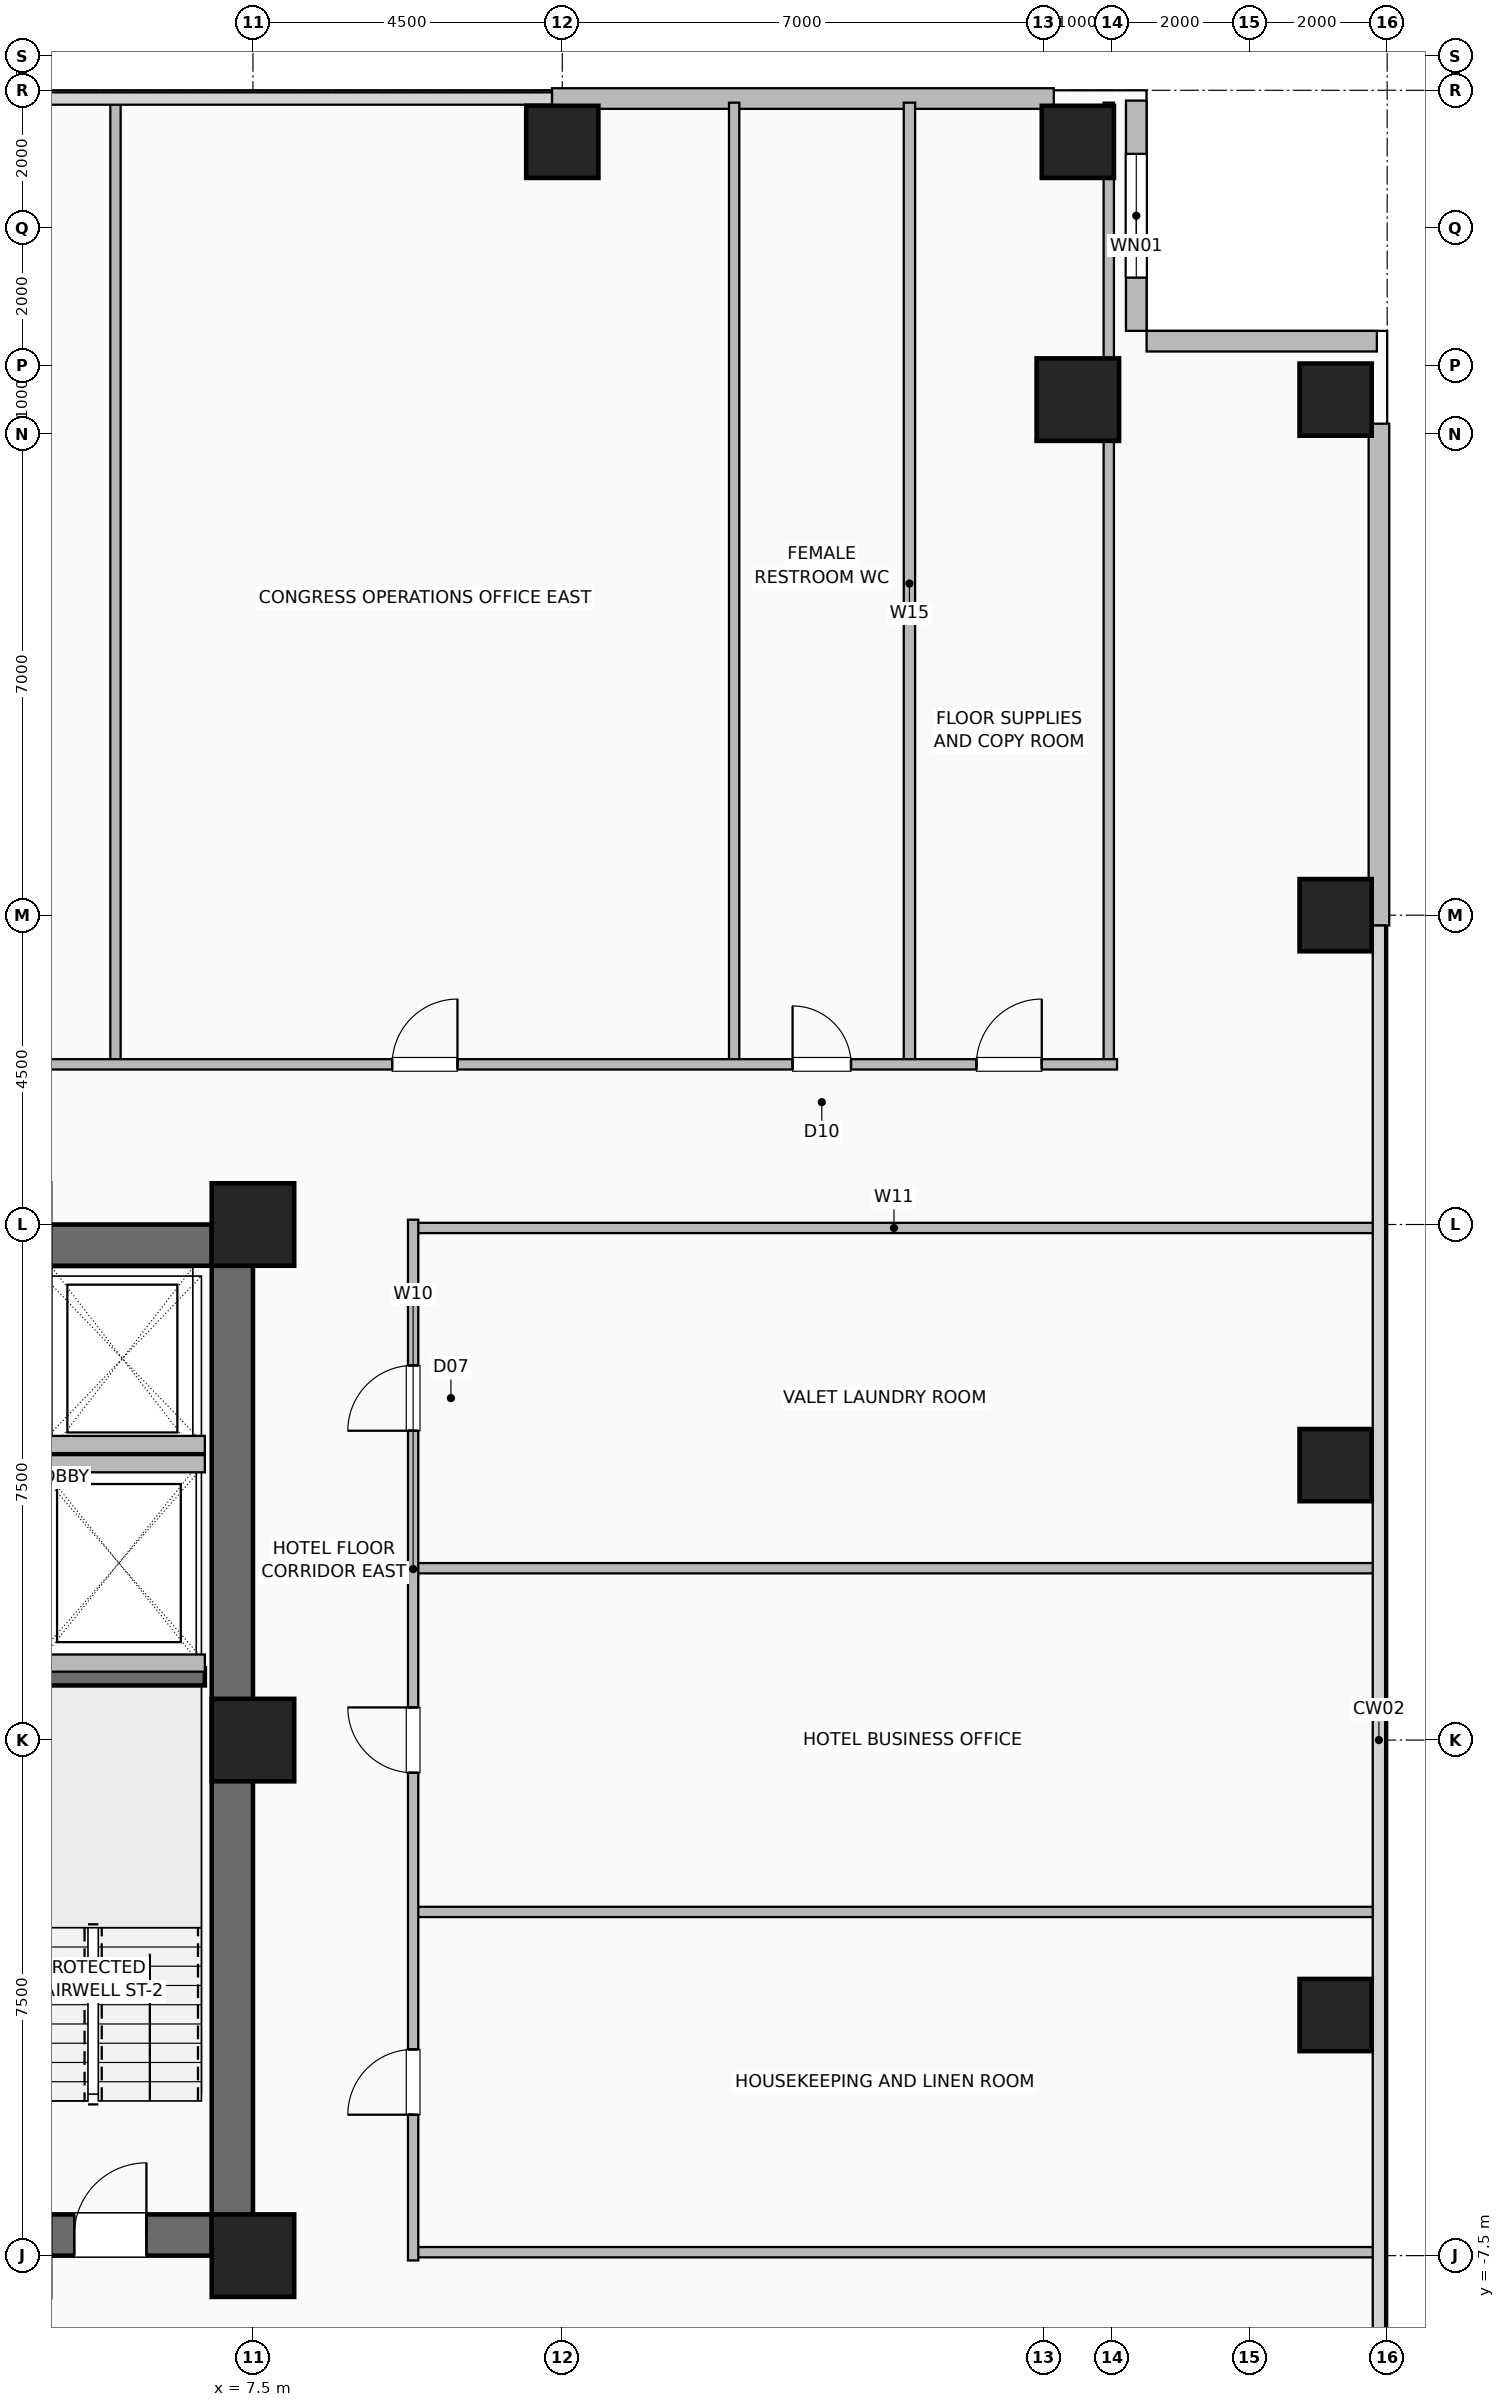
"""IFC4 building model, lengths in metres.
Left out: names, types, materials, properties, quantities, classifications, styles, units other than length and angle.
Written with IfcOpenShell. Run it as: python <this file> out.ifc"""

import sys

from ifc_helpers import new_model, si_unit, direction, frame, frame_2d, origin, origin_2d, place, context, subcontext, project, spatial, rectangle, hollow_rectangle, extrude, element, fill, save


model = new_model("IFC4")
c1 = context("Model", 3, precision=1e-05, world=origin(), true_north=direction((0.0, 1.0)))
c2 = subcontext(c1, "Body", "Model", "MODEL_VIEW")
j1 = project(units=[si_unit("LENGTHUNIT", "METRE"), si_unit("PLANEANGLEUNIT", "RADIAN")], contexts=[c1])
p1 = place(None, origin())
s1 = spatial("IfcSite", under=j1, at=p1, CompositionType="ELEMENT")
p2 = place(p1, origin())
s2 = spatial("IfcBuilding", under=s1, at=p2, CompositionType="ELEMENT")
p3 = place(p2, frame((0.0, 0.0, 44.5)))
s3 = spatial("IfcBuildingStorey", under=s2, at=p3, CompositionType="ELEMENT", Elevation=44.5)
for number, where, z_axis, x_axis in (
    (1, (7.5, -7.5, 0.0), (0.0, 0.0, 1.0), (1.0, 0.0, 0.0)),
    (2, (7.5, 0.0, 0.0), (0.0, 0.0, 1.0), (1.0, 0.0, 0.0)),
    (3, (7.5, 7.5, 0.0), (0.0, 0.0, 1.0), (1.0, 0.0, 0.0)),
):
    element("IfcColumn", number, at=place(p3, frame(where, z_axis=z_axis, x_axis=x_axis)), inside=s3, PredefinedType="COLUMN", context=c2, shape_type="SweptSolid", body=[
        extrude(hollow_rectangle(XDim=1.2, YDim=1.2, WallThickness=0.055, at=origin_2d()), origin(), (0.0, 0.0, 1.0), 3.5),
    ])
for number, where, z_axis, x_axis in (
    (4, (23.25, -4.0, 0.0), (0.0, 0.0, 1.0), (1.0, 0.0, 0.0)),
    (5, (23.25, 4.0, 0.0), (0.0, 0.0, 1.0), (1.0, 0.0, 0.0)),
    (6, (12.0, 23.25, 0.0), (0.0, 0.0, 1.0), (1.0, 0.0, 0.0)),
    (7, (23.25, 12.0, 0.0), (0.0, 0.0, 1.0), (1.0, 0.0, 0.0)),
    (8, (19.5, 23.25, 0.0), (0.0, 0.0, 1.0), (1.0, 0.0, 0.0)),
    (9, (23.25, 19.5, 0.0), (0.0, 0.0, 1.0), (1.0, 0.0, 0.0)),
):
    element("IfcColumn", number, at=place(p3, frame(where, z_axis=z_axis, x_axis=x_axis)), inside=s3, PredefinedType="COLUMN", context=c2, shape_type="SweptSolid", body=[
        extrude(hollow_rectangle(XDim=1.05, YDim=1.05, WallThickness=0.05, at=origin_2d()), origin(), (0.0, 0.0, 1.0), 3.5),
    ])
p4 = place(p3, frame((19.5, 19.5, 0.0), z_axis=(0.0, 0.0, 1.0), x_axis=(1.0, 0.0, 0.0)))
e10 = element("IfcColumn", 10, at=p4, inside=s3, PredefinedType="COLUMN", context=c2, shape_type="SweptSolid", body=[
    extrude(hollow_rectangle(XDim=1.2, YDim=1.2, WallThickness=0.055, at=origin_2d()), origin(), (0.0, 0.0, 1.0), 3.5),
])
for number, where, z_axis, x_axis in (
    (11, (11.85, 23.88, 0.0), (0.0, 0.0, 1.0), (1.0, 0.0, 0.0)),
    (12, (23.88, 11.85, 0.0), (0.0, 0.0, 1.0), (0.0, 1.0, 0.0)),
):
    element("IfcWall", number, at=place(p3, frame(where, z_axis=z_axis, x_axis=x_axis)), inside=s3, PredefinedType="SOLIDWALL", context=c2, shape_type="SweptSolid", body=[
        extrude(rectangle(XDim=7.3, YDim=0.3, at=frame_2d((3.65, 0.0))), origin(), (0.0, 0.0, 1.0), 3.25),
    ])
p5 = place(p3, frame((20.35, 23.85, 0.0), z_axis=(0.0, 0.0, 1.0), x_axis=(0.0, -1.0, 0.0)))
e13 = element("IfcWall", 13, at=p5, inside=s3, PredefinedType="SOLIDWALL", context=c2, shape_type="SweptSolid", body=[
    extrude(rectangle(XDim=3.35, YDim=0.3, at=frame_2d((1.675, 0.0))), origin(), (0.0, 0.0, 1.0), 3.25),
])
p6 = place(p5, frame((0.775, 0.0, 0.9)))
e14 = element("IfcOpeningElement", 14, at=p6, cuts=e13, PredefinedType="OPENING", context=c2, shape_type="SweptSolid", body=[
    extrude(rectangle(XDim=1.8, YDim=1.8, at=frame_2d((0.9, 0.9))), frame((0.0, 0.16, 0.0), z_axis=(0.0, -1.0, 0.0), x_axis=(1.0, 0.0, 0.0)), (0.0, 0.0, 1.0), 0.32),
])
p7 = place(p3, frame((23.85, 20.35, 0.0), z_axis=(0.0, 0.0, 1.0), x_axis=(-1.0, 0.0, 0.0)))
e15 = element("IfcWall", 15, at=p7, inside=s3, PredefinedType="SOLIDWALL", context=c2, shape_type="SweptSolid", body=[
    extrude(rectangle(XDim=3.35, YDim=0.3, at=frame_2d((1.675, 0.0))), origin(), (0.0, 0.0, 1.0), 3.25),
])
p8 = place(p3, frame((-7.5, -7.2, 0.0), z_axis=(0.0, 0.0, 1.0), x_axis=(1.0, 0.0, 0.0)))
e16 = element("IfcWall", 16, at=p8, inside=s3, PredefinedType="SHEAR", context=c2, shape_type="SweptSolid", body=[
    extrude(rectangle(XDim=15.0, YDim=0.6, at=frame_2d((7.5, 0.0))), origin(), (0.0, 0.0, 1.0), 3.25),
])
p9 = place(p8, frame((1.55, 0.0, 0.0)))
e17 = element("IfcOpeningElement", 17, at=p9, cuts=e16, PredefinedType="OPENING", context=c2, shape_type="SweptSolid", body=[
    extrude(rectangle(XDim=1.05, YDim=2.08, at=frame_2d((0.525, 1.04))), frame((0.0, 0.31, 0.0), z_axis=(0.0, -1.0, 0.0), x_axis=(1.0, 0.0, 0.0)), (0.0, 0.0, 1.0), 0.62),
])
p10 = place(p8, frame((12.4, 0.0, 0.0)))
e18 = element("IfcOpeningElement", 18, at=p10, cuts=e16, PredefinedType="OPENING", context=c2, shape_type="SweptSolid", body=[
    extrude(rectangle(XDim=1.05, YDim=2.08, at=frame_2d((0.525, 1.04))), frame((0.0, 0.31, 0.0), z_axis=(0.0, -1.0, 0.0), x_axis=(1.0, 0.0, 0.0)), (0.0, 0.0, 1.0), 0.62),
])
p11 = place(p8, frame((4.64, 0.0, 0.0)))
e19 = element("IfcOpeningElement", 19, at=p11, cuts=e16, PredefinedType="OPENING", context=c2, shape_type="SweptSolid", body=[
    extrude(rectangle(XDim=1.1, YDim=2.2, at=frame_2d((0.55, 1.1))), frame((0.0, 0.31, 0.0), z_axis=(0.0, -1.0, 0.0), x_axis=(1.0, 0.0, 0.0)), (0.0, 0.0, 1.0), 0.62),
])
p12 = place(p8, frame((6.52, 0.0, 0.0)))
e20 = element("IfcOpeningElement", 20, at=p12, cuts=e16, PredefinedType="OPENING", context=c2, shape_type="SweptSolid", body=[
    extrude(rectangle(XDim=1.1, YDim=2.2, at=frame_2d((0.55, 1.1))), frame((0.0, 0.31, 0.0), z_axis=(0.0, -1.0, 0.0), x_axis=(1.0, 0.0, 0.0)), (0.0, 0.0, 1.0), 0.62),
])
p13 = place(p8, frame((8.4, 0.0, 0.0)))
e21 = element("IfcOpeningElement", 21, at=p13, cuts=e16, PredefinedType="OPENING", context=c2, shape_type="SweptSolid", body=[
    extrude(rectangle(XDim=1.1, YDim=2.2, at=frame_2d((0.55, 1.1))), frame((0.0, 0.31, 0.0), z_axis=(0.0, -1.0, 0.0), x_axis=(1.0, 0.0, 0.0)), (0.0, 0.0, 1.0), 0.62),
])
for number, where, z_axis, x_axis in (
    (22, (-7.5, 7.2, 0.0), (0.0, 0.0, 1.0), (1.0, 0.0, 0.0)),
    (23, (7.2, -7.5, 0.0), (0.0, 0.0, 1.0), (0.0, 1.0, 0.0)),
):
    element("IfcWall", number, at=place(p3, frame(where, z_axis=z_axis, x_axis=x_axis)), inside=s3, PredefinedType="SHEAR", context=c2, shape_type="SweptSolid", body=[
        extrude(rectangle(XDim=15.0, YDim=0.6, at=frame_2d((7.5, 0.0))), origin(), (0.0, 0.0, 1.0), 3.25),
    ])
p14 = place(p3, frame((3.47, 0.92, 0.0), z_axis=(0.0, 0.0, 1.0), x_axis=(1.0, 0.0, 0.0)))
e24 = element("IfcWall", 24, at=p14, inside=s3, PredefinedType="SHEAR", context=c2, shape_type="SweptSolid", body=[
    extrude(rectangle(XDim=3.33, YDim=0.25, at=frame_2d((1.665, 0.0))), origin(), (0.0, 0.0, 1.0), 3.25),
])
p15 = place(p3, frame((4.38, 4.3, 0.0), z_axis=(0.0, 0.0, 1.0), x_axis=(1.0, 0.0, 0.0)))
e25 = element("IfcWall", 25, at=p15, inside=s3, PredefinedType="SHEAR", context=c2, shape_type="SweptSolid", body=[
    extrude(rectangle(XDim=2.42, YDim=0.25, at=frame_2d((1.21, 0.0))), origin(), (0.0, 0.0, 1.0), 3.25),
])
for number, where, z_axis, x_axis in (
    (26, (4.28, 1.12, 0.0), (0.0, 0.0, 1.0), (1.0, 0.0, 0.0)),
    (27, (4.28, 4.02, 0.0), (0.0, 0.0, 1.0), (1.0, 0.0, 0.0)),
):
    element("IfcWall", number, at=place(p3, frame(where, z_axis=z_axis, x_axis=x_axis)), inside=s3, PredefinedType="SHEAR", context=c2, shape_type="SweptSolid", body=[
        extrude(rectangle(XDim=2.52, YDim=0.25, at=frame_2d((1.26, 0.0))), origin(), (0.0, 0.0, 1.0), 3.25),
    ])
p16 = place(p3, frame((17.05, 9.83, 0.0), z_axis=(0.0, 0.0, 1.0), x_axis=(0.0, 1.0, 0.0)))
e28 = element("IfcWall", 28, at=p16, inside=s3, PredefinedType="PLUMBINGWALL", context=c2, shape_type="SweptSolid", body=[
    extrude(rectangle(XDim=13.99, YDim=0.165, at=frame_2d((6.995, 0.0))), origin(), (0.0, 0.0, 1.0), 3.25),
])
for number, where, z_axis, x_axis in (
    (29, (5.5, 9.83, 0.0), (0.0, 0.0, 1.0), (0.0, 1.0, 0.0)),
    (30, (14.5, 9.83, 0.0), (0.0, 0.0, 1.0), (0.0, 1.0, 0.0)),
    (31, (19.95, 9.83, 0.0), (0.0, 0.0, 1.0), (0.0, 1.0, 0.0)),
):
    element("IfcWall", number, at=place(p3, frame(where, z_axis=z_axis, x_axis=x_axis)), inside=s3, PredefinedType="PARTITIONING", context=c2, shape_type="SweptSolid", body=[
        extrude(rectangle(XDim=13.99, YDim=0.15, at=frame_2d((6.995, 0.0))), origin(), (0.0, 0.0, 1.0), 3.25),
    ])
p17 = place(p3, frame((-20.07, 9.83, 0.0), z_axis=(0.0, 0.0, 1.0), x_axis=(1.0, 0.0, 0.0)))
e32 = element("IfcWall", 32, at=p17, inside=s3, PredefinedType="PARTITIONING", context=c2, shape_type="SweptSolid", body=[
    extrude(rectangle(XDim=40.14, YDim=0.15, at=frame_2d((20.07, 0.0))), origin(), (0.0, 0.0, 1.0), 3.25),
])
p18 = place(p17, frame((6.62, 0.0, 0.0)))
e33 = element("IfcOpeningElement", 33, at=p18, cuts=e32, PredefinedType="OPENING", context=c2, shape_type="SweptSolid", body=[
    extrude(rectangle(XDim=0.95, YDim=2.06, at=frame_2d((0.475, 1.03))), frame((0.0, 0.085, 0.0), z_axis=(0.0, -1.0, 0.0), x_axis=(1.0, 0.0, 0.0)), (0.0, 0.0, 1.0), 0.17),
])
p19 = place(p17, frame((18.92, 0.0, 0.0)))
e34 = element("IfcOpeningElement", 34, at=p19, cuts=e32, PredefinedType="OPENING", context=c2, shape_type="SweptSolid", body=[
    extrude(rectangle(XDim=1.8, YDim=2.08, at=frame_2d((0.9, 1.04))), frame((0.0, 0.085, 0.0), z_axis=(0.0, -1.0, 0.0), x_axis=(1.0, 0.0, 0.0)), (0.0, 0.0, 1.0), 0.17),
])
p20 = place(p17, frame((29.595, 0.0, 0.0)))
e35 = element("IfcOpeningElement", 35, at=p20, cuts=e32, PredefinedType="OPENING", context=c2, shape_type="SweptSolid", body=[
    extrude(rectangle(XDim=0.95, YDim=2.06, at=frame_2d((0.475, 1.03))), frame((0.0, 0.085, 0.0), z_axis=(0.0, -1.0, 0.0), x_axis=(1.0, 0.0, 0.0)), (0.0, 0.0, 1.0), 0.17),
])
p21 = place(p17, frame((35.42, 0.0, 0.0)))
e36 = element("IfcOpeningElement", 36, at=p21, cuts=e32, PredefinedType="OPENING", context=c2, shape_type="SweptSolid", body=[
    extrude(rectangle(XDim=0.85, YDim=2.05, at=frame_2d((0.425, 1.025))), frame((0.0, 0.085, 0.0), z_axis=(0.0, -1.0, 0.0), x_axis=(1.0, 0.0, 0.0)), (0.0, 0.0, 1.0), 0.17),
])
p22 = place(p17, frame((38.095, 0.0, 0.0)))
e37 = element("IfcOpeningElement", 37, at=p22, cuts=e32, PredefinedType="OPENING", context=c2, shape_type="SweptSolid", body=[
    extrude(rectangle(XDim=0.95, YDim=2.06, at=frame_2d((0.475, 1.03))), frame((0.0, 0.085, 0.0), z_axis=(0.0, -1.0, 0.0), x_axis=(1.0, 0.0, 0.0)), (0.0, 0.0, 1.0), 0.17),
])
for number, where, z_axis, x_axis in (
    (38, (9.83, -7.45, 0.0), (0.0, 0.0, 1.0), (1.0, 0.0, 0.0)),
    (39, (9.83, -2.5, 0.0), (0.0, 0.0, 1.0), (1.0, 0.0, 0.0)),
    (40, (9.83, 2.5, 0.0), (0.0, 0.0, 1.0), (1.0, 0.0, 0.0)),
    (41, (9.83, 7.45, 0.0), (0.0, 0.0, 1.0), (1.0, 0.0, 0.0)),
):
    element("IfcWall", number, at=place(p3, frame(where, z_axis=z_axis, x_axis=x_axis)), inside=s3, PredefinedType="PARTITIONING", context=c2, shape_type="SweptSolid", body=[
        extrude(rectangle(XDim=13.99, YDim=0.15, at=frame_2d((6.995, 0.0))), origin(), (0.0, 0.0, 1.0), 3.25),
    ])
p23 = place(p3, frame((9.83, -7.57, 0.0), z_axis=(0.0, 0.0, 1.0), x_axis=(0.0, 1.0, 0.0)))
e42 = element("IfcWall", 42, at=p23, inside=s3, PredefinedType="PARTITIONING", context=c2, shape_type="SweptSolid", body=[
    extrude(rectangle(XDim=15.14, YDim=0.15, at=frame_2d((7.57, 0.0))), origin(), (0.0, 0.0, 1.0), 3.25),
])
p24 = place(p23, frame((2.12, 0.0, 0.0)))
e43 = element("IfcOpeningElement", 43, at=p24, cuts=e42, PredefinedType="OPENING", context=c2, shape_type="SweptSolid", body=[
    extrude(rectangle(XDim=0.95, YDim=2.06, at=frame_2d((0.475, 1.03))), frame((0.0, 0.085, 0.0), z_axis=(0.0, -1.0, 0.0), x_axis=(1.0, 0.0, 0.0)), (0.0, 0.0, 1.0), 0.17),
])
p25 = place(p23, frame((7.095, 0.0, 0.0)))
e44 = element("IfcOpeningElement", 44, at=p25, cuts=e42, PredefinedType="OPENING", context=c2, shape_type="SweptSolid", body=[
    extrude(rectangle(XDim=0.95, YDim=2.06, at=frame_2d((0.475, 1.03))), frame((0.0, 0.085, 0.0), z_axis=(0.0, -1.0, 0.0), x_axis=(1.0, 0.0, 0.0)), (0.0, 0.0, 1.0), 0.17),
])
p26 = place(p23, frame((12.07, 0.0, 0.0)))
e45 = element("IfcOpeningElement", 45, at=p26, cuts=e42, PredefinedType="OPENING", context=c2, shape_type="SweptSolid", body=[
    extrude(rectangle(XDim=0.95, YDim=2.06, at=frame_2d((0.475, 1.03))), frame((0.0, 0.085, 0.0), z_axis=(0.0, -1.0, 0.0), x_axis=(1.0, 0.0, 0.0)), (0.0, 0.0, 1.0), 0.17),
])
p27 = place(p6, origin())
e46 = element("IfcWindow", 46, at=p27, inside=s3, PartitioningType="SINGLE_PANEL", PredefinedType="WINDOW", context=c2, shape_type="SweptSolid", body=[
    extrude(rectangle(XDim=1.8, YDim=1.8, at=frame_2d((0.9, 0.9))), frame((0.0, 0.03, 0.0), z_axis=(0.0, -1.0, 0.0), x_axis=(1.0, 0.0, 0.0)), (0.0, 0.0, 1.0), 0.06),
])
fill(e14, e46)
p28 = place(p10, origin())
e47 = element("IfcDoor", 47, at=p28, inside=s3, OperationType="SINGLE_SWING_RIGHT", PredefinedType="DOOR", context=c2, shape_type="SweptSolid", body=[
    extrude(rectangle(XDim=1.05, YDim=2.08, at=frame_2d((0.525, 1.04))), frame((0.0, 0.025, 0.0), z_axis=(0.0, -1.0, 0.0), x_axis=(1.0, 0.0, 0.0)), (0.0, 0.0, 1.0), 0.05),
])
fill(e18, e47)
p29 = place(p20, origin())
e48 = element("IfcDoor", 48, at=p29, inside=s3, OperationType="SINGLE_SWING_RIGHT", PredefinedType="DOOR", context=c2, shape_type="SweptSolid", body=[
    extrude(rectangle(XDim=0.95, YDim=2.06, at=frame_2d((0.475, 1.03))), frame((0.0, 0.025, 0.0), z_axis=(0.0, -1.0, 0.0), x_axis=(1.0, 0.0, 0.0)), (0.0, 0.0, 1.0), 0.05),
])
fill(e35, e48)
p30 = place(p21, origin())
e49 = element("IfcDoor", 49, at=p30, inside=s3, OperationType="SINGLE_SWING_LEFT", PredefinedType="DOOR", context=c2, shape_type="SweptSolid", body=[
    extrude(rectangle(XDim=0.85, YDim=2.05, at=frame_2d((0.425, 1.025))), frame((0.0, 0.025, 0.0), z_axis=(0.0, -1.0, 0.0), x_axis=(1.0, 0.0, 0.0)), (0.0, 0.0, 1.0), 0.05),
])
fill(e36, e49)
p31 = place(p22, origin())
e50 = element("IfcDoor", 50, at=p31, inside=s3, OperationType="SINGLE_SWING_RIGHT", PredefinedType="DOOR", context=c2, shape_type="SweptSolid", body=[
    extrude(rectangle(XDim=0.95, YDim=2.06, at=frame_2d((0.475, 1.03))), frame((0.0, 0.025, 0.0), z_axis=(0.0, -1.0, 0.0), x_axis=(1.0, 0.0, 0.0)), (0.0, 0.0, 1.0), 0.05),
])
fill(e37, e50)
p32 = place(p24, origin())
e51 = element("IfcDoor", 51, at=p32, inside=s3, OperationType="SINGLE_SWING_LEFT", PredefinedType="DOOR", context=c2, shape_type="SweptSolid", body=[
    extrude(rectangle(XDim=0.95, YDim=2.06, at=frame_2d((0.475, 1.03))), frame((0.0, 0.025, 0.0), z_axis=(0.0, -1.0, 0.0), x_axis=(1.0, 0.0, 0.0)), (0.0, 0.0, 1.0), 0.05),
])
fill(e43, e51)
p33 = place(p25, origin())
e52 = element("IfcDoor", 52, at=p33, inside=s3, OperationType="SINGLE_SWING_RIGHT", PredefinedType="DOOR", context=c2, shape_type="SweptSolid", body=[
    extrude(rectangle(XDim=0.95, YDim=2.06, at=frame_2d((0.475, 1.03))), frame((0.0, 0.025, 0.0), z_axis=(0.0, -1.0, 0.0), x_axis=(1.0, 0.0, 0.0)), (0.0, 0.0, 1.0), 0.05),
])
fill(e44, e52)
p34 = place(p26, origin())
e53 = element("IfcDoor", 53, at=p34, inside=s3, OperationType="SINGLE_SWING_LEFT", PredefinedType="DOOR", context=c2, shape_type="SweptSolid", body=[
    extrude(rectangle(XDim=0.95, YDim=2.06, at=frame_2d((0.475, 1.03))), frame((0.0, 0.025, 0.0), z_axis=(0.0, -1.0, 0.0), x_axis=(1.0, 0.0, 0.0)), (0.0, 0.0, 1.0), 0.05),
])
fill(e45, e53)
save(model, sys.argv[1])
